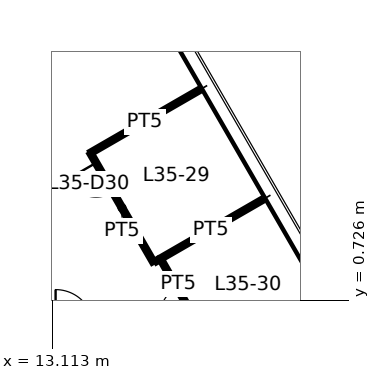
"""IFC4 building model, lengths in metres.
Left out: names, types, materials, properties, quantities, classifications, styles, units other than length and angle.
Written with IfcOpenShell. Run it as: python <this file> out.ifc"""

import sys

from ifc_helpers import new_model, si_unit, direction, frame, frame_2d, origin, place, context, subcontext, project, spatial, rectangle, extrude, element, fill, save


model = new_model("IFC4")
c1 = context("Model", 3, precision=1e-05, world=origin(), true_north=direction((0.0, 1.0)))
c2 = subcontext(c1, "Body", "Model", "MODEL_VIEW")
j1 = project(units=[si_unit("LENGTHUNIT", "METRE"), si_unit("PLANEANGLEUNIT", "RADIAN")], contexts=[c1])
p1 = place(None, origin())
s1 = spatial("IfcSite", under=j1, at=p1, CompositionType="ELEMENT")
p2 = place(p1, origin())
s2 = spatial("IfcBuilding", under=s1, at=p2, CompositionType="ELEMENT")
p3 = place(p2, frame((0.0, 0.0, 140.9)))
s3 = spatial("IfcBuildingStorey", under=s2, at=p3, CompositionType="ELEMENT", Elevation=140.9)
p4 = place(p3, frame((18.62, 3.351, 0.0), z_axis=(0.0, 0.0, 1.0), x_axis=(-0.866043267704, -0.499969057507, 0.0)))
e1 = element("IfcWall", 1, at=p4, inside=s3, PredefinedType="PARTITIONING", context=c2, shape_type="SweptSolid", body=[
    extrude(rectangle(XDim=3.085, YDim=0.1, at=frame_2d((1.542, 0.0))), origin(), (0.0, 0.0, 1.0), 2.95),
])
p5 = place(p3, frame((14.114, 4.595, 0.0), z_axis=(0.0, 0.0, 1.0), x_axis=(0.866020751647, 0.500008057651, 0.0)))
e2 = element("IfcWall", 2, at=p5, inside=s3, PredefinedType="PARTITIONING", context=c2, shape_type="SweptSolid", body=[
    extrude(rectangle(XDim=3.305, YDim=0.1, at=frame_2d((1.653, 0.0))), origin(), (0.0, 0.0, 1.0), 2.95),
])
p6 = place(p3, frame((15.779, 1.71, 0.0), z_axis=(0.0, 0.0, 1.0), x_axis=(-0.500001606164, 0.866024476463, 0.0)))
e3 = element("IfcWall", 3, at=p6, inside=s3, PredefinedType="PARTITIONING", context=c2, shape_type="SweptSolid", body=[
    extrude(rectangle(XDim=3.331, YDim=0.1, at=frame_2d((1.666, 0.0))), origin(), (0.0, 0.0, 1.0), 2.95),
])
p7 = place(p6, frame((2.131, 0.0, 0.0)))
e4 = element("IfcOpeningElement", 4, at=p7, cuts=e3, PredefinedType="OPENING", context=c2, shape_type="SweptSolid", body=[
    extrude(rectangle(XDim=0.9, YDim=2.1, at=frame_2d((0.45, 1.05))), frame((0.0, 0.06, 0.0), z_axis=(0.0, -1.0, 0.0), x_axis=(1.0, 0.0, 0.0)), (0.0, 0.0, 1.0), 0.12),
])
p8 = place(p3, frame((16.986, 0.02, 0.0), z_axis=(0.0, 0.0, 1.0), x_axis=(-0.498096123952, 0.867121820337, 0.0)))
e5 = element("IfcWall", 5, at=p8, inside=s3, PredefinedType="PARTITIONING", context=c2, shape_type="SweptSolid", body=[
    extrude(rectangle(XDim=2.067, YDim=0.1, at=frame_2d((1.034, 0.0))), origin(), (0.0, 0.0, 1.0), 2.95),
])
p9 = place(p8, frame((0.3, 0.0, 0.0)))
e6 = element("IfcOpeningElement", 6, at=p9, cuts=e5, PredefinedType="OPENING", context=c2, shape_type="SweptSolid", body=[
    extrude(rectangle(XDim=0.9, YDim=2.1, at=frame_2d((0.45, 1.05))), frame((0.0, 0.06, 0.0), z_axis=(0.0, -1.0, 0.0), x_axis=(1.0, 0.0, 0.0)), (0.0, 0.0, 1.0), 0.12),
])
p10 = place(p3, frame((15.823, 1.735, 0.0), z_axis=(0.0, 0.0, 1.0), x_axis=(0.867234405398, 0.497900076415, 0.0)))
e7 = element("IfcWall", 7, at=p10, inside=s3, PredefinedType="PARTITIONING", context=c2, shape_type="SweptSolid", body=[
    extrude(rectangle(XDim=0.104, YDim=0.1, at=frame_2d((0.052, 0.0))), origin(), (0.0, 0.0, 1.0), 2.95),
])
p11 = place(p7, origin())
e8 = element("IfcDoor", 8, at=p11, inside=s3, OperationType="SINGLE_SWING_RIGHT", PredefinedType="DOOR", context=c2, shape_type="SweptSolid", body=[
    extrude(rectangle(XDim=0.9, YDim=2.1, at=frame_2d((0.45, 1.05))), frame((0.0, 0.025, 0.0), z_axis=(0.0, -1.0, 0.0), x_axis=(1.0, 0.0, 0.0)), (0.0, 0.0, 1.0), 0.05),
])
fill(e4, e8)
p12 = place(p9, origin())
e9 = element("IfcDoor", 9, at=p12, inside=s3, OperationType="SINGLE_SWING_LEFT", PredefinedType="DOOR", context=c2, shape_type="SweptSolid", body=[
    extrude(rectangle(XDim=0.9, YDim=2.1, at=frame_2d((0.45, 1.05))), frame((0.0, 0.025, 0.0), z_axis=(0.0, -1.0, 0.0), x_axis=(1.0, 0.0, 0.0)), (0.0, 0.0, 1.0), 0.05),
])
fill(e6, e9)
save(model, sys.argv[1])
